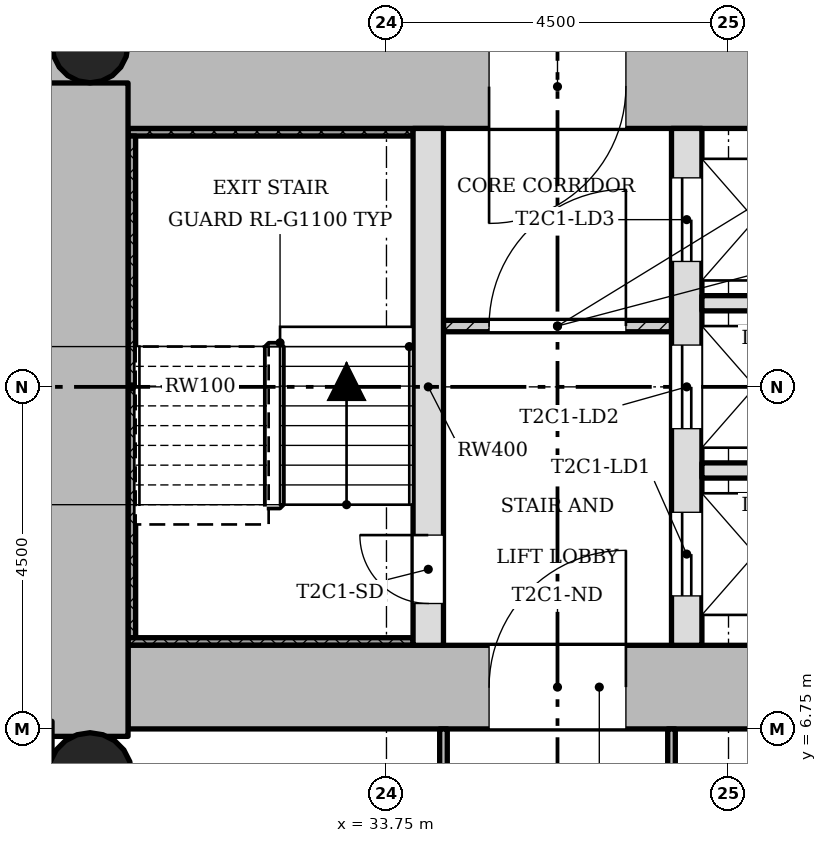
"""IFC4 building model, lengths in metres.
Left out: names, types, materials, properties, quantities, classifications, styles, units other than length and angle.
Written with IfcOpenShell. Run it as: python <this file> out.ifc"""

import sys

from ifc_helpers import new_model, si_unit, direction, frame, frame_2d, origin, origin_2d, place, context, subcontext, project, spatial, rectangle, hollow_circle, extrude, element, fill, save


model = new_model("IFC4")
c1 = context("Model", 3, precision=1e-05, world=origin(), true_north=direction((0.0, 1.0)))
c2 = subcontext(c1, "Body", "Model", "MODEL_VIEW")
j1 = project(units=[si_unit("LENGTHUNIT", "METRE"), si_unit("PLANEANGLEUNIT", "RADIAN")], contexts=[c1])
p1 = place(None, origin())
s1 = spatial("IfcSite", under=j1, at=p1, CompositionType="ELEMENT")
p2 = place(p1, origin())
s2 = spatial("IfcBuilding", under=s1, at=p2, CompositionType="ELEMENT")
p3 = place(p2, frame((0.0, 0.0, 61.9)))
s3 = spatial("IfcBuildingStorey", under=s2, at=p3, CompositionType="ELEMENT", Elevation=61.9)
p4 = place(p3, frame((30.35, 7.3, 0.0), z_axis=(0.0, 0.0, 1.0), x_axis=(1.0, 0.0, 0.0)))
e1 = element("IfcWall", 1, at=p4, inside=s3, PredefinedType="SHEAR", context=c2, shape_type="SweptSolid", body=[
    extrude(rectangle(XDim=12.4, YDim=1.1, at=frame_2d((6.2, 0.0))), origin(), (0.0, 0.0, 1.0), 3.4),
])
p5 = place(p4, frame((4.75, 0.0, 0.0)))
e2 = element("IfcOpeningElement", 2, at=p5, cuts=e1, PredefinedType="OPENING", context=c2, shape_type="SweptSolid", body=[
    extrude(rectangle(XDim=1.8, YDim=2.1, at=frame_2d((0.9, 1.05))), frame((0.0, 0.56, 0.0), z_axis=(0.0, -1.0, 0.0), x_axis=(1.0, 0.0, 0.0)), (0.0, 0.0, 1.0), 1.12),
])
p6 = place(p3, frame((41.65, 15.2, 0.0), z_axis=(0.0, 0.0, 1.0), x_axis=(-1.0, 0.0, 0.0)))
e3 = element("IfcWall", 3, at=p6, inside=s3, PredefinedType="SHEAR", context=c2, shape_type="SweptSolid", body=[
    extrude(rectangle(XDim=12.4, YDim=1.1, at=frame_2d((6.2, 0.0))), origin(), (0.0, 0.0, 1.0), 3.4),
])
p7 = place(p6, frame((4.75, 0.0, 0.0)))
e4 = element("IfcOpeningElement", 4, at=p7, cuts=e3, PredefinedType="OPENING", context=c2, shape_type="SweptSolid", body=[
    extrude(rectangle(XDim=1.8, YDim=2.1, at=frame_2d((0.9, 1.05))), frame((0.0, 0.56, 0.0), z_axis=(0.0, -1.0, 0.0), x_axis=(1.0, 0.0, 0.0)), (0.0, 0.0, 1.0), 1.12),
])
p8 = place(p3, frame((29.8, 15.248, 0.0), z_axis=(0.0, 0.0, 1.0), x_axis=(0.0, -1.0, 0.0)))
e5 = element("IfcWall", 5, at=p8, inside=s3, PredefinedType="SHEAR", context=c2, shape_type="SweptSolid", body=[
    extrude(rectangle(XDim=8.596, YDim=1.1, at=frame_2d((4.298, 0.0))), origin(), (0.0, 0.0, 1.0), 3.4),
])
p9 = place(p3, frame((34.3, 7.85, 0.0), z_axis=(0.0, 0.0, 1.0), x_axis=(0.0, 1.0, 0.0)))
e6 = element("IfcWall", 6, at=p9, inside=s3, PredefinedType="SHEAR", context=c2, shape_type="SweptSolid", body=[
    extrude(rectangle(XDim=6.8, YDim=0.4, at=frame_2d((3.4, 0.0))), origin(), (0.0, 0.0, 1.0), 3.4),
])
p10 = place(p9, frame((0.55, 0.0, 0.0)))
e7 = element("IfcOpeningElement", 7, at=p10, cuts=e6, PredefinedType="OPENING", context=c2, shape_type="SweptSolid", body=[
    extrude(rectangle(XDim=0.9, YDim=2.1, at=frame_2d((0.45, 1.05))), frame((0.0, 0.21, 0.0), z_axis=(0.0, -1.0, 0.0), x_axis=(1.0, 0.0, 0.0)), (0.0, 0.0, 1.0), 0.42),
])
p11 = place(p3, frame((37.7, 7.85, 0.0), z_axis=(0.0, 0.0, 1.0), x_axis=(0.0, 1.0, 0.0)))
e8 = element("IfcWall", 8, at=p11, inside=s3, PredefinedType="SHEAR", context=c2, shape_type="SweptSolid", body=[
    extrude(rectangle(XDim=6.8, YDim=0.4, at=frame_2d((3.4, 0.0))), origin(), (0.0, 0.0, 1.0), 3.4),
])
p12 = place(p11, frame((0.65, 0.0, 0.0)))
e9 = element("IfcOpeningElement", 9, at=p12, cuts=e8, PredefinedType="OPENING", context=c2, shape_type="SweptSolid", body=[
    extrude(rectangle(XDim=1.1, YDim=2.1, at=frame_2d((0.55, 1.05))), frame((0.0, 0.21, 0.0), z_axis=(0.0, -1.0, 0.0), x_axis=(1.0, 0.0, 0.0)), (0.0, 0.0, 1.0), 0.42),
])
p13 = place(p11, frame((2.85, 0.0, 0.0)))
e10 = element("IfcOpeningElement", 10, at=p13, cuts=e8, PredefinedType="OPENING", context=c2, shape_type="SweptSolid", body=[
    extrude(rectangle(XDim=1.1, YDim=2.1, at=frame_2d((0.55, 1.05))), frame((0.0, 0.21, 0.0), z_axis=(0.0, -1.0, 0.0), x_axis=(1.0, 0.0, 0.0)), (0.0, 0.0, 1.0), 0.42),
])
p14 = place(p11, frame((5.05, 0.0, 0.0)))
e11 = element("IfcOpeningElement", 11, at=p14, cuts=e8, PredefinedType="OPENING", context=c2, shape_type="SweptSolid", body=[
    extrude(rectangle(XDim=1.1, YDim=2.1, at=frame_2d((0.55, 1.05))), frame((0.0, 0.21, 0.0), z_axis=(0.0, -1.0, 0.0), x_axis=(1.0, 0.0, 0.0)), (0.0, 0.0, 1.0), 0.42),
])
p15 = place(p3, frame((29.85, 15.75, 0.0), z_axis=(0.0, 0.0, 1.0), x_axis=(1.0, 0.0, 0.0)))
e12 = element("IfcColumn", 12, at=p15, inside=s3, PredefinedType="COLUMN", context=c2, shape_type="SweptSolid", body=[
    extrude(hollow_circle(Radius=0.5, WallThickness=0.036, at=origin_2d()), origin(), (0.0, 0.0, 1.0), 3.4),
])
p16 = place(p3, frame((29.85, 6.15, 0.0), z_axis=(0.0, 0.0, 1.0), x_axis=(1.0, 0.0, 0.0)))
e13 = element("IfcColumn", 13, at=p16, inside=s3, PredefinedType="COLUMN", context=c2, shape_type="SweptSolid", body=[
    extrude(hollow_circle(Radius=0.55, WallThickness=0.04, at=origin_2d()), origin(), (0.0, 0.0, 1.0), 3.4),
])
p17 = place(p3, frame((37.5, 12.05, 0.0), z_axis=(0.0, 0.0, 1.0), x_axis=(-1.0, 0.0, 0.0)))
e14 = element("IfcWall", 14, at=p17, inside=s3, PredefinedType="PARTITIONING", context=c2, shape_type="SweptSolid", body=[
    extrude(rectangle(XDim=3.0, YDim=0.15, at=frame_2d((1.5, 0.0))), origin(), (0.0, 0.0, 1.0), 3.0),
])
p18 = place(p17, frame((0.6, 0.0, 0.0)))
e15 = element("IfcOpeningElement", 15, at=p18, cuts=e14, PredefinedType="OPENING", context=c2, shape_type="SweptSolid", body=[
    extrude(rectangle(XDim=1.8, YDim=2.1, at=frame_2d((0.9, 1.05))), frame((0.0, 0.085, 0.0), z_axis=(0.0, -1.0, 0.0), x_axis=(1.0, 0.0, 0.0)), (0.0, 0.0, 1.0), 0.17),
])
for number, where, z_axis, x_axis in (
    (16, (41.65, 10.15, 0.0), (0.0, 0.0, 1.0), (-1.0, 0.0, 0.0)),
    (17, (41.65, 12.35, 0.0), (0.0, 0.0, 1.0), (-1.0, 0.0, 0.0)),
):
    element("IfcWall", number, at=place(p3, frame(where, z_axis=z_axis, x_axis=x_axis)), inside=s3, PredefinedType="SOLIDWALL", context=c2, shape_type="SweptSolid", body=[
        extrude(rectangle(XDim=3.75, YDim=0.2, at=frame_2d((1.875, 0.0))), origin(), (0.0, 0.0, 1.0), 3.0),
    ])
p19 = place(p3, frame((37.5, 0.9, 0.0), z_axis=(0.0, 0.0, 1.0), x_axis=(0.0, 1.0, 0.0)))
e18 = element("IfcWall", 18, at=p19, inside=s3, PredefinedType="PARTITIONING", context=c2, shape_type="SweptSolid", body=[
    extrude(rectangle(XDim=5.85, YDim=0.1, at=frame_2d((2.925, 0.0))), origin(), (0.0, 0.0, 1.0), 3.0),
])
p20 = place(p19, frame((2.475, 0.0, 0.0)))
e19 = element("IfcOpeningElement", 19, at=p20, cuts=e18, PredefinedType="OPENING", context=c2, shape_type="SweptSolid", body=[
    extrude(rectangle(XDim=0.9, YDim=2.1, at=frame_2d((0.45, 1.05))), frame((0.0, 0.06, 0.0), z_axis=(0.0, -1.0, 0.0), x_axis=(1.0, 0.0, 0.0)), (0.0, 0.0, 1.0), 0.12),
])
p21 = place(p3, frame((34.5, 0.9, 0.0), z_axis=(0.0, 0.0, 1.0), x_axis=(0.0, 1.0, 0.0)))
e20 = element("IfcWall", 20, at=p21, inside=s3, PredefinedType="PARTITIONING", context=c2, shape_type="SweptSolid", body=[
    extrude(rectangle(XDim=5.85, YDim=0.1, at=frame_2d((2.925, 0.0))), origin(), (0.0, 0.0, 1.0), 3.0),
])
p22 = place(p21, frame((2.475, 0.0, 0.0)))
e21 = element("IfcOpeningElement", 21, at=p22, cuts=e20, PredefinedType="OPENING", context=c2, shape_type="SweptSolid", body=[
    extrude(rectangle(XDim=0.9, YDim=2.1, at=frame_2d((0.45, 1.05))), frame((0.0, 0.06, 0.0), z_axis=(0.0, -1.0, 0.0), x_axis=(1.0, 0.0, 0.0)), (0.0, 0.0, 1.0), 0.12),
])
p23 = place(p3, frame((34.1, 14.6, 0.0), z_axis=(0.0, 0.0, 1.0), x_axis=(-1.0, 0.0, 0.0)))
e22 = element("IfcWall", 22, at=p23, inside=s3, PredefinedType="SHEAR", context=c2, shape_type="SweptSolid", body=[
    extrude(rectangle(XDim=3.75, YDim=0.1, at=frame_2d((1.875, 0.0))), origin(), (0.0, 0.0, 1.0), 3.4),
])
p24 = place(p3, frame((30.4, 7.95, 0.0), z_axis=(0.0, 0.0, 1.0), x_axis=(0.0, 1.0, 0.0)))
e23 = element("IfcWall", 23, at=p24, inside=s3, PredefinedType="SHEAR", context=c2, shape_type="SweptSolid", body=[
    extrude(rectangle(XDim=6.6, YDim=0.1, at=frame_2d((3.3, 0.0))), origin(), (0.0, 0.0, 1.0), 3.4),
])
p25 = place(p3, frame((34.1, 7.9, 0.0), z_axis=(0.0, 0.0, 1.0), x_axis=(-1.0, 0.0, 0.0)))
e24 = element("IfcWall", 24, at=p25, inside=s3, PredefinedType="SHEAR", context=c2, shape_type="SweptSolid", body=[
    extrude(rectangle(XDim=3.75, YDim=0.1, at=frame_2d((1.875, 0.0))), origin(), (0.0, 0.0, 1.0), 3.4),
])
p26 = place(p18, origin())
e25 = element("IfcDoor", 25, at=p26, inside=s3, OperationType="SINGLE_SWING_LEFT", PredefinedType="DOOR", context=c2, shape_type="SweptSolid", body=[
    extrude(rectangle(XDim=1.8, YDim=2.1, at=frame_2d((0.9, 1.05))), frame((0.0, 0.025, 0.0), z_axis=(0.0, -1.0, 0.0), x_axis=(1.0, 0.0, 0.0)), (0.0, 0.0, 1.0), 0.05),
])
fill(e15, e25)
p27 = place(p10, origin())
e26 = element("IfcDoor", 26, at=p27, inside=s3, OperationType="SINGLE_SWING_LEFT", PredefinedType="DOOR", context=c2, shape_type="SweptSolid", body=[
    extrude(rectangle(XDim=0.9, YDim=2.1, at=frame_2d((0.45, 1.05))), frame((0.0, 0.025, 0.0), z_axis=(0.0, -1.0, 0.0), x_axis=(1.0, 0.0, 0.0)), (0.0, 0.0, 1.0), 0.05),
])
fill(e7, e26)
p28 = place(p12, origin())
e27 = element("IfcDoor", 27, at=p28, inside=s3, OperationType="SLIDING_TO_LEFT", PredefinedType="DOOR", context=c2, shape_type="SweptSolid", body=[
    extrude(rectangle(XDim=1.1, YDim=2.1, at=frame_2d((0.55, 1.05))), frame((0.0, 0.025, 0.0), z_axis=(0.0, -1.0, 0.0), x_axis=(1.0, 0.0, 0.0)), (0.0, 0.0, 1.0), 0.05),
])
fill(e9, e27)
p29 = place(p13, origin())
e28 = element("IfcDoor", 28, at=p29, inside=s3, OperationType="SLIDING_TO_LEFT", PredefinedType="DOOR", context=c2, shape_type="SweptSolid", body=[
    extrude(rectangle(XDim=1.1, YDim=2.1, at=frame_2d((0.55, 1.05))), frame((0.0, 0.025, 0.0), z_axis=(0.0, -1.0, 0.0), x_axis=(1.0, 0.0, 0.0)), (0.0, 0.0, 1.0), 0.05),
])
fill(e10, e28)
p30 = place(p14, origin())
e29 = element("IfcDoor", 29, at=p30, inside=s3, OperationType="SLIDING_TO_LEFT", PredefinedType="DOOR", context=c2, shape_type="SweptSolid", body=[
    extrude(rectangle(XDim=1.1, YDim=2.1, at=frame_2d((0.55, 1.05))), frame((0.0, 0.025, 0.0), z_axis=(0.0, -1.0, 0.0), x_axis=(1.0, 0.0, 0.0)), (0.0, 0.0, 1.0), 0.05),
])
fill(e11, e29)
p31 = place(p5, origin())
e30 = element("IfcDoor", 30, at=p31, inside=s3, OperationType="SINGLE_SWING_LEFT", PredefinedType="DOOR", context=c2, shape_type="SweptSolid", body=[
    extrude(rectangle(XDim=1.8, YDim=2.1, at=frame_2d((0.9, 1.05))), frame((0.0, 0.025, 0.0), z_axis=(0.0, -1.0, 0.0), x_axis=(1.0, 0.0, 0.0)), (0.0, 0.0, 1.0), 0.05),
])
fill(e2, e30)
p32 = place(p7, origin())
e31 = element("IfcDoor", 31, at=p32, inside=s3, OperationType="SINGLE_SWING_LEFT", PredefinedType="DOOR", context=c2, shape_type="SweptSolid", body=[
    extrude(rectangle(XDim=1.8, YDim=2.1, at=frame_2d((0.9, 1.05))), frame((0.0, 0.025, 0.0), z_axis=(0.0, -1.0, 0.0), x_axis=(1.0, 0.0, 0.0)), (0.0, 0.0, 1.0), 0.05),
])
fill(e4, e31)
save(model, sys.argv[1])
